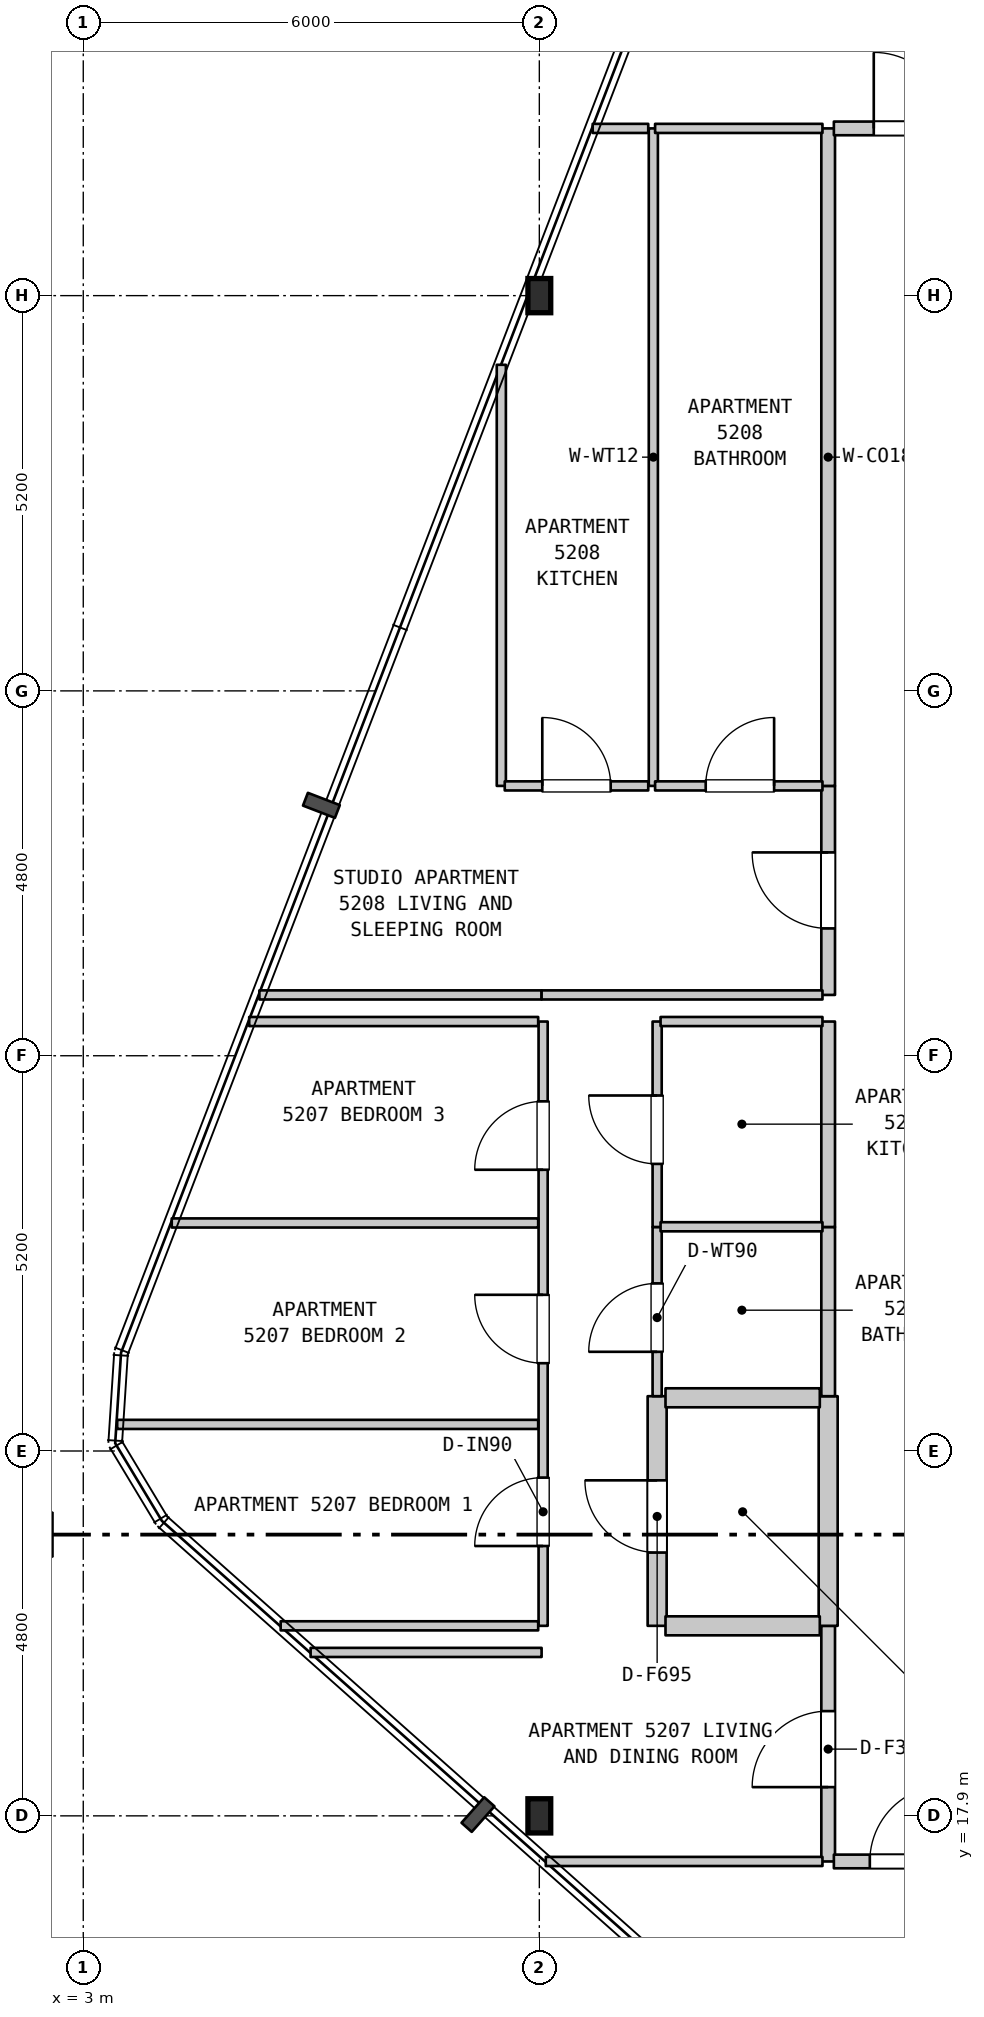
"""IFC4 building model, lengths in metres.
Left out: names, types, materials, properties, quantities, classifications, styles, units other than length and angle.
Written with IfcOpenShell. Run it as: python <this file> out.ifc"""

import sys

from ifc_helpers import new_model, si_unit, direction, frame, frame_2d, origin, origin_2d, place, context, subcontext, project, spatial, rectangle, i_section, extrude, element, fill, save


model = new_model("IFC4")
c1 = context("Model", 3, precision=1e-05, world=origin(), true_north=direction((0.0, 1.0)))
c2 = subcontext(c1, "Body", "Model", "MODEL_VIEW")
j1 = project(units=[si_unit("LENGTHUNIT", "METRE"), si_unit("PLANEANGLEUNIT", "RADIAN")], contexts=[c1])
p1 = place(None, origin())
s1 = spatial("IfcSite", under=j1, at=p1, CompositionType="ELEMENT")
p2 = place(p1, origin())
s2 = spatial("IfcBuilding", under=s1, at=p2, CompositionType="ELEMENT")
p3 = place(p2, frame((0.0, 0.0, 210.6)))
s3 = spatial("IfcBuildingStorey", under=s2, at=p3, CompositionType="ELEMENT", Elevation=210.6)
for number, where, z_axis, x_axis in (
    (1, (9.0, 17.9, 0.0), (0.0, 0.0, 1.0), (1.0, 0.0, 0.0)),
    (2, (9.0, 37.9, 0.0), (0.0, 0.0, 1.0), (1.0, 0.0, 0.0)),
):
    element("IfcColumn", number, at=place(p3, frame(where, z_axis=z_axis, x_axis=x_axis)), inside=s3, PredefinedType="COLUMN", context=c2, shape_type="SweptSolid", body=[
        extrude(i_section(OverallWidth=0.3, OverallDepth=0.45, WebThickness=0.014, FlangeThickness=0.026, FilletRadius=0.027, at=origin_2d()), origin(), (0.0, 0.0, 1.0), 3.7),
    ])
p4 = place(p3, frame((8.5, 31.45, 0.0), z_axis=(0.0, 0.0, 1.0), x_axis=(0.0, 1.0, 0.0)))
e3 = element("IfcWall", 3, at=p4, inside=s3, PredefinedType="PARTITIONING", context=c2, shape_type="SweptSolid", body=[
    extrude(rectangle(XDim=5.54, YDim=0.12, at=frame_2d((2.77, 0.0))), origin(), (0.0, 0.0, 1.0), 3.39),
])
p5 = place(p3, frame((9.05, 20.4, 0.0), z_axis=(0.0, 0.0, 1.0), x_axis=(0.0, 1.0, 0.0)))
e4 = element("IfcWall", 4, at=p5, inside=s3, PredefinedType="PARTITIONING", context=c2, shape_type="SweptSolid", body=[
    extrude(rectangle(XDim=7.95, YDim=0.12, at=frame_2d((3.975, 0.0))), origin(), (0.0, 0.0, 1.0), 2.79),
])
p6 = place(p5, frame((1.05, 0.0, 0.0)))
e5 = element("IfcOpeningElement", 5, at=p6, cuts=e4, PredefinedType="OPENING", context=c2, shape_type="SweptSolid", body=[
    extrude(rectangle(XDim=0.9, YDim=2.15, at=frame_2d((0.45, 1.075))), frame((0.0, 0.07, 0.0), z_axis=(0.0, -1.0, 0.0), x_axis=(1.0, 0.0, 0.0)), (0.0, 0.0, 1.0), 0.14),
])
p7 = place(p5, frame((3.455, 0.0, 0.0)))
e6 = element("IfcOpeningElement", 6, at=p7, cuts=e4, PredefinedType="OPENING", context=c2, shape_type="SweptSolid", body=[
    extrude(rectangle(XDim=0.9, YDim=2.15, at=frame_2d((0.45, 1.075))), frame((0.0, 0.07, 0.0), z_axis=(0.0, -1.0, 0.0), x_axis=(1.0, 0.0, 0.0)), (0.0, 0.0, 1.0), 0.14),
])
p8 = place(p5, frame((6.0, 0.0, 0.0)))
e7 = element("IfcOpeningElement", 7, at=p8, cuts=e4, PredefinedType="OPENING", context=c2, shape_type="SweptSolid", body=[
    extrude(rectangle(XDim=0.9, YDim=2.15, at=frame_2d((0.45, 1.075))), frame((0.0, 0.07, 0.0), z_axis=(0.0, -1.0, 0.0), x_axis=(1.0, 0.0, 0.0)), (0.0, 0.0, 1.0), 0.14),
])
p9 = place(p3, frame((10.5, 31.45, 0.0), z_axis=(0.0, 0.0, 1.0), x_axis=(0.0, 1.0, 0.0)))
e8 = element("IfcWall", 8, at=p9, inside=s3, PredefinedType="PARTITIONING", context=c2, shape_type="SweptSolid", body=[
    extrude(rectangle(XDim=8.65, YDim=0.12, at=frame_2d((4.325, 0.0))), origin(), (0.0, 0.0, 1.0), 3.39),
])
p10 = place(p3, frame((10.55, 20.4, 0.0), z_axis=(0.0, 0.0, 1.0), x_axis=(0.0, 1.0, 0.0)))
e9 = element("IfcWall", 9, at=p10, inside=s3, PredefinedType="STANDARD", context=c2, shape_type="SweptSolid", body=[
    extrude(rectangle(XDim=3.021, YDim=0.25, at=frame_2d((1.51, 0.0))), origin(), (0.0, 0.0, 1.0), 3.39),
])
p11 = place(p10, frame((0.964, 0.0, 0.0)))
e10 = element("IfcOpeningElement", 10, at=p11, cuts=e9, PredefinedType="OPENING", context=c2, shape_type="SweptSolid", body=[
    extrude(rectangle(XDim=0.95, YDim=2.15, at=frame_2d((0.475, 1.075))), frame((0.0, 0.135, 0.0), z_axis=(0.0, -1.0, 0.0), x_axis=(1.0, 0.0, 0.0)), (0.0, 0.0, 1.0), 0.27),
])
p12 = place(p3, frame((10.55, 23.421, 0.0), z_axis=(0.0, 0.0, 1.0), x_axis=(0.0, 1.0, 0.0)))
e11 = element("IfcWall", 11, at=p12, inside=s3, PredefinedType="PARTITIONING", context=c2, shape_type="SweptSolid", body=[
    extrude(rectangle(XDim=2.226, YDim=0.12, at=frame_2d((1.113, 0.0))), origin(), (0.0, 0.0, 1.0), 3.39),
])
p13 = place(p12, frame((0.584, 0.0, 0.0)))
e12 = element("IfcOpeningElement", 12, at=p13, cuts=e11, PredefinedType="OPENING", context=c2, shape_type="SweptSolid", body=[
    extrude(rectangle(XDim=0.9, YDim=2.1, at=frame_2d((0.45, 1.05))), frame((0.0, 0.07, 0.0), z_axis=(0.0, -1.0, 0.0), x_axis=(1.0, 0.0, 0.0)), (0.0, 0.0, 1.0), 0.14),
])
p14 = place(p3, frame((10.55, 25.647, 0.0), z_axis=(0.0, 0.0, 1.0), x_axis=(0.0, 1.0, 0.0)))
e13 = element("IfcWall", 13, at=p14, inside=s3, PredefinedType="PARTITIONING", context=c2, shape_type="SweptSolid", body=[
    extrude(rectangle(XDim=2.703, YDim=0.12, at=frame_2d((1.352, 0.0))), origin(), (0.0, 0.0, 1.0), 3.39),
])
p15 = place(p14, frame((0.83, 0.0, 0.0)))
e14 = element("IfcOpeningElement", 14, at=p15, cuts=e13, PredefinedType="OPENING", context=c2, shape_type="SweptSolid", body=[
    extrude(rectangle(XDim=0.9, YDim=2.15, at=frame_2d((0.45, 1.075))), frame((0.0, 0.07, 0.0), z_axis=(0.0, -1.0, 0.0), x_axis=(1.0, 0.0, 0.0)), (0.0, 0.0, 1.0), 0.14),
])
p16 = place(p3, frame((12.8, 17.3, 0.0), z_axis=(0.0, 0.0, 1.0), x_axis=(0.0, 1.0, 0.0)))
e15 = element("IfcWall", 15, at=p16, inside=s3, PredefinedType="STANDARD", context=c2, shape_type="SweptSolid", body=[
    extrude(rectangle(XDim=3.1, YDim=0.18, at=frame_2d((1.55, 0.0))), origin(), (0.0, 0.0, 1.0), 3.39),
])
p17 = place(p16, frame((0.978, 0.0, 0.0)))
e16 = element("IfcOpeningElement", 16, at=p17, cuts=e15, PredefinedType="OPENING", context=c2, shape_type="SweptSolid", body=[
    extrude(rectangle(XDim=1.0, YDim=2.15, at=frame_2d((0.5, 1.075))), frame((0.0, 0.1, 0.0), z_axis=(0.0, -1.0, 0.0), x_axis=(1.0, 0.0, 0.0)), (0.0, 0.0, 1.0), 0.2),
])
p18 = place(p3, frame((12.8, 20.4, 0.0), z_axis=(0.0, 0.0, 1.0), x_axis=(0.0, 1.0, 0.0)))
e17 = element("IfcWall", 17, at=p18, inside=s3, PredefinedType="STANDARD", context=c2, shape_type="SweptSolid", body=[
    extrude(rectangle(XDim=3.021, YDim=0.25, at=frame_2d((1.51, 0.0))), origin(), (0.0, 0.0, 1.0), 3.39),
])
p19 = place(p3, frame((12.8, 23.421, 0.0), z_axis=(0.0, 0.0, 1.0), x_axis=(0.0, 1.0, 0.0)))
e18 = element("IfcWall", 18, at=p19, inside=s3, PredefinedType="STANDARD", context=c2, shape_type="SweptSolid", body=[
    extrude(rectangle(XDim=2.226, YDim=0.18, at=frame_2d((1.113, 0.0))), origin(), (0.0, 0.0, 1.0), 3.39),
])
p20 = place(p3, frame((12.8, 25.647, 0.0), z_axis=(0.0, 0.0, 1.0), x_axis=(0.0, 1.0, 0.0)))
e19 = element("IfcWall", 19, at=p20, inside=s3, PredefinedType="STANDARD", context=c2, shape_type="SweptSolid", body=[
    extrude(rectangle(XDim=2.703, YDim=0.18, at=frame_2d((1.352, 0.0))), origin(), (0.0, 0.0, 1.0), 3.39),
])
p21 = place(p3, frame((12.8, 28.7, 0.0), z_axis=(0.0, 0.0, 1.0), x_axis=(0.0, 1.0, 0.0)))
e20 = element("IfcWall", 20, at=p21, inside=s3, PredefinedType="STANDARD", context=c2, shape_type="SweptSolid", body=[
    extrude(rectangle(XDim=2.75, YDim=0.18, at=frame_2d((1.375, 0.0))), origin(), (0.0, 0.0, 1.0), 3.39),
])
p22 = place(p21, frame((0.875, 0.0, 0.0)))
e21 = element("IfcOpeningElement", 21, at=p22, cuts=e20, PredefinedType="OPENING", context=c2, shape_type="SweptSolid", body=[
    extrude(rectangle(XDim=1.0, YDim=2.15, at=frame_2d((0.5, 1.075))), frame((0.0, 0.1, 0.0), z_axis=(0.0, -1.0, 0.0), x_axis=(1.0, 0.0, 0.0)), (0.0, 0.0, 1.0), 0.2),
])
p23 = place(p3, frame((12.8, 31.45, 0.0), z_axis=(0.0, 0.0, 1.0), x_axis=(0.0, 1.0, 0.0)))
e22 = element("IfcWall", 22, at=p23, inside=s3, PredefinedType="STANDARD", context=c2, shape_type="SweptSolid", body=[
    extrude(rectangle(XDim=8.65, YDim=0.18, at=frame_2d((4.325, 0.0))), origin(), (0.0, 0.0, 1.0), 3.39),
])
p24 = place(p3, frame((9.085, 17.3, 0.0), z_axis=(0.0, 0.0, 1.0), x_axis=(1.0, 0.0, 0.0)))
e23 = element("IfcWall", 23, at=p24, inside=s3, PredefinedType="PARTITIONING", context=c2, shape_type="SweptSolid", body=[
    extrude(rectangle(XDim=3.64, YDim=0.12, at=frame_2d((1.82, 0.0))), origin(), (0.0, 0.0, 1.0), 3.39),
])
p25 = place(p3, frame((12.875, 17.3, 0.0), z_axis=(0.0, 0.0, 1.0), x_axis=(1.0, 0.0, 0.0)))
e24 = element("IfcWall", 24, at=p25, inside=s3, PredefinedType="STANDARD", context=c2, shape_type="SweptSolid", body=[
    extrude(rectangle(XDim=3.58, YDim=0.18, at=frame_2d((1.79, 0.0))), origin(), (0.0, 0.0, 1.0), 3.39),
])
p26 = place(p25, frame((0.473, 0.0, 0.0)))
e25 = element("IfcOpeningElement", 25, at=p26, cuts=e24, PredefinedType="OPENING", context=c2, shape_type="SweptSolid", body=[
    extrude(rectangle(XDim=1.0, YDim=2.15, at=frame_2d((0.5, 1.075))), frame((0.0, 0.1, 0.0), z_axis=(0.0, -1.0, 0.0), x_axis=(1.0, 0.0, 0.0)), (0.0, 0.0, 1.0), 0.2),
])
p27 = place(p3, frame((5.991, 20.05, 0.0), z_axis=(0.0, 0.0, 1.0), x_axis=(1.0, 0.0, 0.0)))
e26 = element("IfcWall", 26, at=p27, inside=s3, PredefinedType="PARTITIONING", context=c2, shape_type="SweptSolid", body=[
    extrude(rectangle(XDim=3.039, YDim=0.12, at=frame_2d((1.52, 0.0))), origin(), (0.0, 0.0, 1.0), 3.39),
])
p28 = place(p3, frame((5.597, 20.4, 0.0), z_axis=(0.0, 0.0, 1.0), x_axis=(1.0, 0.0, 0.0)))
e27 = element("IfcWall", 27, at=p28, inside=s3, PredefinedType="PARTITIONING", context=c2, shape_type="SweptSolid", body=[
    extrude(rectangle(XDim=3.388, YDim=0.12, at=frame_2d((1.694, 0.0))), origin(), (0.0, 0.0, 1.0), 3.39),
])
p29 = place(p3, frame((10.66, 20.4, 0.0), z_axis=(0.0, 0.0, 1.0), x_axis=(1.0, 0.0, 0.0)))
e28 = element("IfcWall", 28, at=p29, inside=s3, PredefinedType="STANDARD", context=c2, shape_type="SweptSolid", body=[
    extrude(rectangle(XDim=2.03, YDim=0.25, at=frame_2d((1.015, 0.0))), origin(), (0.0, 0.0, 1.0), 3.39),
])
p30 = place(p3, frame((3.446, 23.05, 0.0), z_axis=(0.0, 0.0, 1.0), x_axis=(1.0, 0.0, 0.0)))
e29 = element("IfcWall", 29, at=p30, inside=s3, PredefinedType="PARTITIONING", context=c2, shape_type="SweptSolid", body=[
    extrude(rectangle(XDim=5.539, YDim=0.12, at=frame_2d((2.77, 0.0))), origin(), (0.0, 0.0, 1.0), 3.39),
])
p31 = place(p3, frame((10.66, 23.4, 0.0), z_axis=(0.0, 0.0, 1.0), x_axis=(1.0, 0.0, 0.0)))
e30 = element("IfcWall", 30, at=p31, inside=s3, PredefinedType="STANDARD", context=c2, shape_type="SweptSolid", body=[
    extrude(rectangle(XDim=2.03, YDim=0.25, at=frame_2d((1.015, 0.0))), origin(), (0.0, 0.0, 1.0), 3.39),
])
p32 = place(p3, frame((10.595, 25.65, 0.0), z_axis=(0.0, 0.0, 1.0), x_axis=(1.0, 0.0, 0.0)))
e31 = element("IfcWall", 31, at=p32, inside=s3, PredefinedType="PARTITIONING", context=c2, shape_type="SweptSolid", body=[
    extrude(rectangle(XDim=2.13, YDim=0.12, at=frame_2d((1.065, 0.0))), origin(), (0.0, 0.0, 1.0), 3.39),
])
p33 = place(p3, frame((4.164, 25.7, 0.0), z_axis=(0.0, 0.0, 1.0), x_axis=(1.0, 0.0, 0.0)))
e32 = element("IfcWall", 32, at=p33, inside=s3, PredefinedType="PARTITIONING", context=c2, shape_type="SweptSolid", body=[
    extrude(rectangle(XDim=4.821, YDim=0.12, at=frame_2d((2.411, 0.0))), origin(), (0.0, 0.0, 1.0), 3.39),
])
p34 = place(p3, frame((5.183, 28.35, 0.0), z_axis=(0.0, 0.0, 1.0), x_axis=(1.0, 0.0, 0.0)))
e33 = element("IfcWall", 33, at=p34, inside=s3, PredefinedType="PARTITIONING", context=c2, shape_type="SweptSolid", body=[
    extrude(rectangle(XDim=3.802, YDim=0.12, at=frame_2d((1.901, 0.0))), origin(), (0.0, 0.0, 1.0), 3.39),
])
p35 = place(p3, frame((10.595, 28.35, 0.0), z_axis=(0.0, 0.0, 1.0), x_axis=(1.0, 0.0, 0.0)))
e34 = element("IfcWall", 34, at=p35, inside=s3, PredefinedType="PARTITIONING", context=c2, shape_type="SweptSolid", body=[
    extrude(rectangle(XDim=2.13, YDim=0.12, at=frame_2d((1.065, 0.0))), origin(), (0.0, 0.0, 1.0), 3.39),
])
p36 = place(p3, frame((5.317, 28.7, 0.0), z_axis=(0.0, 0.0, 1.0), x_axis=(1.0, 0.0, 0.0)))
e35 = element("IfcWall", 35, at=p36, inside=s3, PredefinedType="PARTITIONING", context=c2, shape_type="SweptSolid", body=[
    extrude(rectangle(XDim=3.713, YDim=0.12, at=frame_2d((1.856, 0.0))), origin(), (0.0, 0.0, 1.0), 3.39),
])
p37 = place(p3, frame((9.03, 28.7, 0.0), z_axis=(0.0, 0.0, 1.0), x_axis=(1.0, 0.0, 0.0)))
e36 = element("IfcWall", 36, at=p37, inside=s3, PredefinedType="PARTITIONING", context=c2, shape_type="SweptSolid", body=[
    extrude(rectangle(XDim=3.695, YDim=0.12, at=frame_2d((1.848, 0.0))), origin(), (0.0, 0.0, 1.0), 3.39),
])
p38 = place(p3, frame((8.545, 31.45, 0.0), z_axis=(0.0, 0.0, 1.0), x_axis=(1.0, 0.0, 0.0)))
e37 = element("IfcWall", 37, at=p38, inside=s3, PredefinedType="PARTITIONING", context=c2, shape_type="SweptSolid", body=[
    extrude(rectangle(XDim=1.888, YDim=0.12, at=frame_2d((0.944, 0.0))), origin(), (0.0, 0.0, 1.0), 3.39),
])
p39 = place(p38, frame((0.494, 0.0, 0.0)))
e38 = element("IfcOpeningElement", 38, at=p39, cuts=e37, PredefinedType="OPENING", context=c2, shape_type="SweptSolid", body=[
    extrude(rectangle(XDim=0.9, YDim=2.15, at=frame_2d((0.45, 1.075))), frame((0.0, 0.07, 0.0), z_axis=(0.0, -1.0, 0.0), x_axis=(1.0, 0.0, 0.0)), (0.0, 0.0, 1.0), 0.14),
])
p40 = place(p3, frame((10.523, 31.45, 0.0), z_axis=(0.0, 0.0, 1.0), x_axis=(1.0, 0.0, 0.0)))
e39 = element("IfcWall", 39, at=p40, inside=s3, PredefinedType="PARTITIONING", context=c2, shape_type="SweptSolid", body=[
    extrude(rectangle(XDim=2.202, YDim=0.12, at=frame_2d((1.101, 0.0))), origin(), (0.0, 0.0, 1.0), 3.39),
])
p41 = place(p40, frame((0.666, 0.0, 0.0)))
e40 = element("IfcOpeningElement", 40, at=p41, cuts=e39, PredefinedType="OPENING", context=c2, shape_type="SweptSolid", body=[
    extrude(rectangle(XDim=0.9, YDim=2.1, at=frame_2d((0.45, 1.05))), frame((0.0, 0.07, 0.0), z_axis=(0.0, -1.0, 0.0), x_axis=(1.0, 0.0, 0.0)), (0.0, 0.0, 1.0), 0.14),
])
p42 = place(p3, frame((9.702, 40.1, 0.0), z_axis=(0.0, 0.0, 1.0), x_axis=(1.0, 0.0, 0.0)))
e41 = element("IfcWall", 41, at=p42, inside=s3, PredefinedType="PARTITIONING", context=c2, shape_type="SweptSolid", body=[
    extrude(rectangle(XDim=0.731, YDim=0.12, at=frame_2d((0.366, 0.0))), origin(), (0.0, 0.0, 1.0), 3.39),
])
p43 = place(p3, frame((10.523, 40.1, 0.0), z_axis=(0.0, 0.0, 1.0), x_axis=(1.0, 0.0, 0.0)))
e42 = element("IfcWall", 42, at=p43, inside=s3, PredefinedType="PARTITIONING", context=c2, shape_type="SweptSolid", body=[
    extrude(rectangle(XDim=2.202, YDim=0.12, at=frame_2d((1.101, 0.0))), origin(), (0.0, 0.0, 1.0), 3.39),
])
p44 = place(p3, frame((12.875, 40.1, 0.0), z_axis=(0.0, 0.0, 1.0), x_axis=(1.0, 0.0, 0.0)))
e43 = element("IfcWall", 43, at=p44, inside=s3, PredefinedType="STANDARD", context=c2, shape_type="SweptSolid", body=[
    extrude(rectangle(XDim=2.125, YDim=0.18, at=frame_2d((1.062, 0.0))), origin(), (0.0, 0.0, 1.0), 3.39),
])
p45 = place(p44, frame((0.525, 0.0, 0.0)))
e44 = element("IfcOpeningElement", 44, at=p45, cuts=e43, PredefinedType="OPENING", context=c2, shape_type="SweptSolid", body=[
    extrude(rectangle(XDim=1.0, YDim=2.15, at=frame_2d((0.5, 1.075))), frame((0.0, 0.1, 0.0), z_axis=(0.0, -1.0, 0.0), x_axis=(1.0, 0.0, 0.0)), (0.0, 0.0, 1.0), 0.2),
])
p46 = place(p6, origin())
e45 = element("IfcDoor", 45, at=p46, inside=s3, OperationType="SINGLE_SWING_LEFT", PredefinedType="DOOR", context=c2, shape_type="SweptSolid", body=[
    extrude(rectangle(XDim=0.9, YDim=2.15, at=frame_2d((0.45, 1.075))), frame((0.0, 0.025, 0.0), z_axis=(0.0, -1.0, 0.0), x_axis=(1.0, 0.0, 0.0)), (0.0, 0.0, 1.0), 0.05),
])
fill(e5, e45)
p47 = place(p7, origin())
e46 = element("IfcDoor", 46, at=p47, inside=s3, OperationType="SINGLE_SWING_RIGHT", PredefinedType="DOOR", context=c2, shape_type="SweptSolid", body=[
    extrude(rectangle(XDim=0.9, YDim=2.15, at=frame_2d((0.45, 1.075))), frame((0.0, 0.025, 0.0), z_axis=(0.0, -1.0, 0.0), x_axis=(1.0, 0.0, 0.0)), (0.0, 0.0, 1.0), 0.05),
])
fill(e6, e46)
p48 = place(p8, origin())
e47 = element("IfcDoor", 47, at=p48, inside=s3, OperationType="SINGLE_SWING_LEFT", PredefinedType="DOOR", context=c2, shape_type="SweptSolid", body=[
    extrude(rectangle(XDim=0.9, YDim=2.15, at=frame_2d((0.45, 1.075))), frame((0.0, 0.025, 0.0), z_axis=(0.0, -1.0, 0.0), x_axis=(1.0, 0.0, 0.0)), (0.0, 0.0, 1.0), 0.05),
])
fill(e7, e47)
p49 = place(p11, origin())
e48 = element("IfcDoor", 48, at=p49, inside=s3, OperationType="SINGLE_SWING_RIGHT", PredefinedType="DOOR", context=c2, shape_type="SweptSolid", body=[
    extrude(rectangle(XDim=0.95, YDim=2.15, at=frame_2d((0.475, 1.075))), frame((0.0, 0.025, 0.0), z_axis=(0.0, -1.0, 0.0), x_axis=(1.0, 0.0, 0.0)), (0.0, 0.0, 1.0), 0.05),
])
fill(e10, e48)
p50 = place(p13, origin())
e49 = element("IfcDoor", 49, at=p50, inside=s3, OperationType="SINGLE_SWING_LEFT", PredefinedType="DOOR", context=c2, shape_type="SweptSolid", body=[
    extrude(rectangle(XDim=0.9, YDim=2.1, at=frame_2d((0.45, 1.05))), frame((0.0, 0.025, 0.0), z_axis=(0.0, -1.0, 0.0), x_axis=(1.0, 0.0, 0.0)), (0.0, 0.0, 1.0), 0.05),
])
fill(e12, e49)
p51 = place(p15, origin())
e50 = element("IfcDoor", 50, at=p51, inside=s3, OperationType="SINGLE_SWING_RIGHT", PredefinedType="DOOR", context=c2, shape_type="SweptSolid", body=[
    extrude(rectangle(XDim=0.9, YDim=2.15, at=frame_2d((0.45, 1.075))), frame((0.0, 0.025, 0.0), z_axis=(0.0, -1.0, 0.0), x_axis=(1.0, 0.0, 0.0)), (0.0, 0.0, 1.0), 0.05),
])
fill(e14, e50)
p52 = place(p17, origin())
e51 = element("IfcDoor", 51, at=p52, inside=s3, OperationType="SINGLE_SWING_LEFT", PredefinedType="DOOR", context=c2, shape_type="SweptSolid", body=[
    extrude(rectangle(XDim=1.0, YDim=2.15, at=frame_2d((0.5, 1.075))), frame((0.0, 0.025, 0.0), z_axis=(0.0, -1.0, 0.0), x_axis=(1.0, 0.0, 0.0)), (0.0, 0.0, 1.0), 0.05),
])
fill(e16, e51)
p53 = place(p22, origin())
e52 = element("IfcDoor", 52, at=p53, inside=s3, OperationType="SINGLE_SWING_RIGHT", PredefinedType="DOOR", context=c2, shape_type="SweptSolid", body=[
    extrude(rectangle(XDim=1.0, YDim=2.15, at=frame_2d((0.5, 1.075))), frame((0.0, 0.025, 0.0), z_axis=(0.0, -1.0, 0.0), x_axis=(1.0, 0.0, 0.0)), (0.0, 0.0, 1.0), 0.05),
])
fill(e21, e52)
p54 = place(p26, origin())
e53 = element("IfcDoor", 53, at=p54, inside=s3, OperationType="SINGLE_SWING_RIGHT", PredefinedType="DOOR", context=c2, shape_type="SweptSolid", body=[
    extrude(rectangle(XDim=1.0, YDim=2.15, at=frame_2d((0.5, 1.075))), frame((0.0, 0.025, 0.0), z_axis=(0.0, -1.0, 0.0), x_axis=(1.0, 0.0, 0.0)), (0.0, 0.0, 1.0), 0.05),
])
fill(e25, e53)
p55 = place(p39, origin())
e54 = element("IfcDoor", 54, at=p55, inside=s3, OperationType="SINGLE_SWING_LEFT", PredefinedType="DOOR", context=c2, shape_type="SweptSolid", body=[
    extrude(rectangle(XDim=0.9, YDim=2.15, at=frame_2d((0.45, 1.075))), frame((0.0, 0.025, 0.0), z_axis=(0.0, -1.0, 0.0), x_axis=(1.0, 0.0, 0.0)), (0.0, 0.0, 1.0), 0.05),
])
fill(e38, e54)
p56 = place(p41, origin())
e55 = element("IfcDoor", 55, at=p56, inside=s3, OperationType="SINGLE_SWING_RIGHT", PredefinedType="DOOR", context=c2, shape_type="SweptSolid", body=[
    extrude(rectangle(XDim=0.9, YDim=2.1, at=frame_2d((0.45, 1.05))), frame((0.0, 0.025, 0.0), z_axis=(0.0, -1.0, 0.0), x_axis=(1.0, 0.0, 0.0)), (0.0, 0.0, 1.0), 0.05),
])
fill(e40, e55)
p57 = place(p45, origin())
e56 = element("IfcDoor", 56, at=p57, inside=s3, OperationType="SINGLE_SWING_LEFT", PredefinedType="DOOR", context=c2, shape_type="SweptSolid", body=[
    extrude(rectangle(XDim=1.0, YDim=2.15, at=frame_2d((0.5, 1.075))), frame((0.0, 0.025, 0.0), z_axis=(0.0, -1.0, 0.0), x_axis=(1.0, 0.0, 0.0)), (0.0, 0.0, 1.0), 0.05),
])
fill(e44, e56)
save(model, sys.argv[1])
